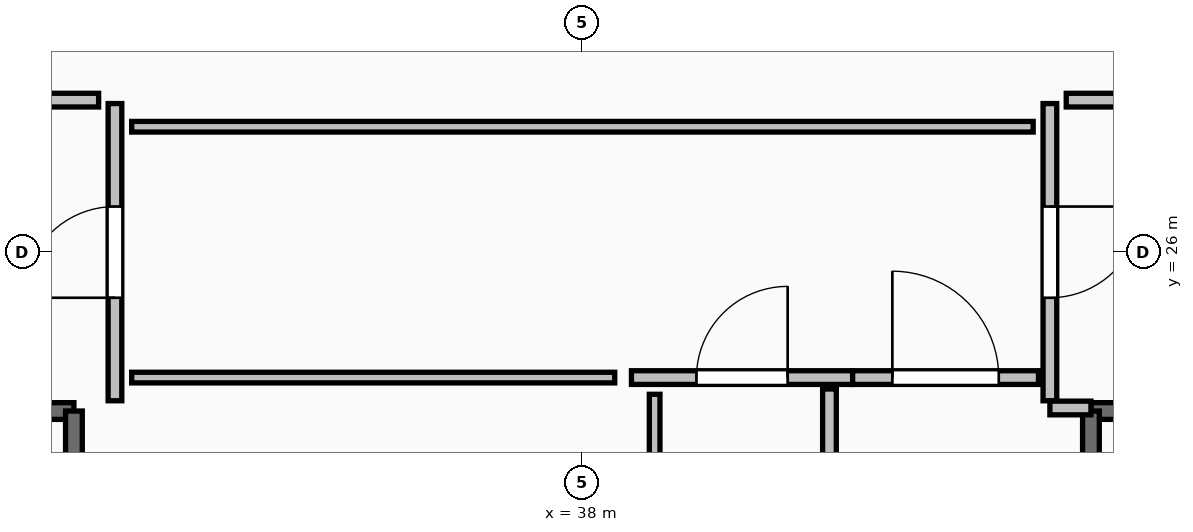
"""IFC4 building model, lengths in metres.
Left out: names, types, materials, properties, quantities, classifications, styles, units other than length and angle.
Written with IfcOpenShell. Run it as: python <this file> out.ifc"""

import sys

from ifc_helpers import new_model, si_unit, direction, frame, frame_2d, origin, place, context, subcontext, project, spatial, rectangle, extrude, element, fill, save


model = new_model("IFC4")
c1 = context("Model", 3, precision=1e-05, world=origin(), true_north=direction((0.0, 1.0)))
c2 = subcontext(c1, "Body", "Model", "MODEL_VIEW")
j1 = project(units=[si_unit("LENGTHUNIT", "METRE"), si_unit("PLANEANGLEUNIT", "RADIAN")], contexts=[c1])
p1 = place(None, origin())
s1 = spatial("IfcSite", under=j1, at=p1, CompositionType="ELEMENT")
p2 = place(p1, origin())
s2 = spatial("IfcBuilding", under=s1, at=p2, CompositionType="ELEMENT")
p3 = place(p2, frame((0.0, 0.0, -4.8)))
s3 = spatial("IfcBuildingStorey", under=s2, at=p3, CompositionType="ELEMENT", Elevation=-4.8)
p4 = place(p3, frame((27.94, 23.91, 0.0), z_axis=(0.0, 0.0, 1.0), x_axis=(1.0, 0.0, 0.0)))
e1 = element("IfcWall", 1, at=p4, inside=s3, PredefinedType="SOLIDWALL", context=c2, shape_type="SweptSolid", body=[
    extrude(rectangle(XDim=3.37, YDim=0.22, at=frame_2d((1.685, 0.0))), origin(), (0.0, 0.0, 1.0), 4.46),
])
p5 = place(p4, frame((1.135, 0.0, 0.0)))
e2 = element("IfcOpeningElement", 2, at=p5, cuts=e1, PredefinedType="OPENING", context=c2, shape_type="SweptSolid", body=[
    extrude(rectangle(XDim=1.1, YDim=2.15, at=frame_2d((0.55, 1.075))), frame((0.0, 0.125, 0.0), z_axis=(0.0, -1.0, 0.0), x_axis=(1.0, 0.0, 0.0)), (0.0, 0.0, 1.0), 0.25),
])
p6 = place(p3, frame((31.31, 23.91, 0.0), z_axis=(0.0, 0.0, 1.0), x_axis=(0.0, -1.0, 0.0)))
e3 = element("IfcWall", 3, at=p6, inside=s3, PredefinedType="SOLIDWALL", context=c2, shape_type="SweptSolid", body=[
    extrude(rectangle(XDim=7.42, YDim=0.22, at=frame_2d((3.71, 0.0))), origin(), (0.0, 0.0, 1.0), 4.46),
])
p7 = place(p3, frame((44.69, 23.91, 0.0), z_axis=(0.0, 0.0, 1.0), x_axis=(1.0, 0.0, 0.0)))
e4 = element("IfcWall", 4, at=p7, inside=s3, PredefinedType="SOLIDWALL", context=c2, shape_type="SweptSolid", body=[
    extrude(rectangle(XDim=3.37, YDim=0.22, at=frame_2d((1.685, 0.0))), origin(), (0.0, 0.0, 1.0), 4.46),
])
p8 = place(p7, frame((1.135, 0.0, 0.0)))
e5 = element("IfcOpeningElement", 5, at=p8, cuts=e4, PredefinedType="OPENING", context=c2, shape_type="SweptSolid", body=[
    extrude(rectangle(XDim=1.1, YDim=2.15, at=frame_2d((0.55, 1.075))), frame((0.0, 0.125, 0.0), z_axis=(0.0, -1.0, 0.0), x_axis=(1.0, 0.0, 0.0)), (0.0, 0.0, 1.0), 0.25),
])
p9 = place(p3, frame((44.69, 16.49, 0.0), z_axis=(0.0, 0.0, 1.0), x_axis=(0.0, 1.0, 0.0)))
e6 = element("IfcWall", 6, at=p9, inside=s3, PredefinedType="SOLIDWALL", context=c2, shape_type="SweptSolid", body=[
    extrude(rectangle(XDim=7.42, YDim=0.22, at=frame_2d((3.71, 0.0))), origin(), (0.0, 0.0, 1.0), 4.46),
])
p10 = place(p3, frame((31.85, 24.045, 0.0), z_axis=(0.0, 0.0, 1.0), x_axis=(0.0, 1.0, 0.0)))
e7 = element("IfcWall", 7, at=p10, inside=s3, PredefinedType="PARTITIONING", context=c2, shape_type="SweptSolid", body=[
    extrude(rectangle(XDim=3.91, YDim=0.18, at=frame_2d((1.955, 0.0))), origin(), (0.0, 0.0, 1.0), 4.46),
])
p11 = place(p10, frame((1.355, 0.0, 0.0)))
e8 = element("IfcOpeningElement", 8, at=p11, cuts=e7, PredefinedType="OPENING", context=c2, shape_type="SweptSolid", body=[
    extrude(rectangle(XDim=1.2, YDim=2.15, at=frame_2d((0.6, 1.075))), frame((0.0, 0.105, 0.0), z_axis=(0.0, -1.0, 0.0), x_axis=(1.0, 0.0, 0.0)), (0.0, 0.0, 1.0), 0.21),
])
p12 = place(p3, frame((44.15, 27.955, 0.0), z_axis=(0.0, 0.0, 1.0), x_axis=(0.0, -1.0, 0.0)))
e9 = element("IfcWall", 9, at=p12, inside=s3, PredefinedType="PARTITIONING", context=c2, shape_type="SweptSolid", body=[
    extrude(rectangle(XDim=3.91, YDim=0.18, at=frame_2d((1.955, 0.0))), origin(), (0.0, 0.0, 1.0), 4.46),
])
p13 = place(p12, frame((1.355, 0.0, 0.0)))
e10 = element("IfcOpeningElement", 10, at=p13, cuts=e9, PredefinedType="OPENING", context=c2, shape_type="SweptSolid", body=[
    extrude(rectangle(XDim=1.2, YDim=2.15, at=frame_2d((0.6, 1.075))), frame((0.0, 0.105, 0.0), z_axis=(0.0, -1.0, 0.0), x_axis=(1.0, 0.0, 0.0)), (0.0, 0.0, 1.0), 0.21),
])
p14 = place(p3, frame((44.15, 23.95, 0.0), z_axis=(0.0, 0.0, 1.0), x_axis=(1.0, 0.0, 0.0)))
e11 = element("IfcWall", 11, at=p14, inside=s3, PredefinedType="PARTITIONING", context=c2, shape_type="SweptSolid", body=[
    extrude(rectangle(XDim=0.54, YDim=0.18, at=frame_2d((0.27, 0.0))), origin(), (0.0, 0.0, 1.0), 4.46),
])
p15 = place(p3, frame((38.645, 24.35, 0.0), z_axis=(0.0, 0.0, 1.0), x_axis=(1.0, 0.0, 0.0)))
e12 = element("IfcWall", 12, at=p15, inside=s3, PredefinedType="PARTITIONING", context=c2, shape_type="SweptSolid", body=[
    extrude(rectangle(XDim=2.91, YDim=0.18, at=frame_2d((1.455, 0.0))), origin(), (0.0, 0.0, 1.0), 4.46),
])
p16 = place(p15, frame((0.855, 0.0, 0.0)))
e13 = element("IfcOpeningElement", 13, at=p16, cuts=e12, PredefinedType="OPENING", context=c2, shape_type="SweptSolid", body=[
    extrude(rectangle(XDim=1.2, YDim=2.15, at=frame_2d((0.6, 1.075))), frame((0.0, 0.105, 0.0), z_axis=(0.0, -1.0, 0.0), x_axis=(1.0, 0.0, 0.0)), (0.0, 0.0, 1.0), 0.21),
])
p17 = place(p3, frame((41.555, 24.35, 0.0), z_axis=(0.0, 0.0, 1.0), x_axis=(1.0, 0.0, 0.0)))
e14 = element("IfcWall", 14, at=p17, inside=s3, PredefinedType="PARTITIONING", context=c2, shape_type="SweptSolid", body=[
    extrude(rectangle(XDim=2.445, YDim=0.18, at=frame_2d((1.223, 0.0))), origin(), (0.0, 0.0, 1.0), 4.46),
])
p18 = place(p17, frame((0.522, 0.0, 0.0)))
e15 = element("IfcOpeningElement", 15, at=p18, cuts=e14, PredefinedType="OPENING", context=c2, shape_type="SweptSolid", body=[
    extrude(rectangle(XDim=1.4, YDim=2.2, at=frame_2d((0.7, 1.1))), frame((0.0, 0.105, 0.0), z_axis=(0.0, -1.0, 0.0), x_axis=(1.0, 0.0, 0.0)), (0.0, 0.0, 1.0), 0.21),
])
p19 = place(p3, frame((41.25, 19.105, 0.0), z_axis=(0.0, 0.0, 1.0), x_axis=(0.0, 1.0, 0.0)))
e16 = element("IfcWall", 16, at=p19, inside=s3, PredefinedType="PARTITIONING", context=c2, shape_type="SweptSolid", body=[
    extrude(rectangle(XDim=5.095, YDim=0.18, at=frame_2d((2.547, 0.0))), origin(), (0.0, 0.0, 1.0), 4.46),
])
p20 = place(p19, frame((1.847, 0.0, 0.0)))
e17 = element("IfcOpeningElement", 17, at=p20, cuts=e16, PredefinedType="OPENING", context=c2, shape_type="SweptSolid", body=[
    extrude(rectangle(XDim=1.4, YDim=2.2, at=frame_2d((0.7, 1.1))), frame((0.0, 0.105, 0.0), z_axis=(0.0, -1.0, 0.0), x_axis=(1.0, 0.0, 0.0)), (0.0, 0.0, 1.0), 0.21),
])
for number, where, z_axis, x_axis in (
    (18, (31.635, 28.0, 0.0), (0.0, 0.0, 1.0), (-1.0, 0.0, 0.0)),
    (19, (45.28, 28.0, 0.0), (0.0, 0.0, 1.0), (-1.0, 0.0, 0.0)),
):
    element("IfcWall", number, at=place(p3, frame(where, z_axis=z_axis, x_axis=x_axis)), inside=s3, PredefinedType="PARTITIONING", context=c2, shape_type="SweptSolid", body=[
        extrude(rectangle(XDim=0.915, YDim=0.18, at=frame_2d((0.458, 0.0))), origin(), (0.0, 0.0, 1.0), 4.46),
    ])
p21 = place(p3, frame((43.93, 27.65, 0.0), z_axis=(0.0, 0.0, 1.0), x_axis=(-1.0, 0.0, 0.0)))
e20 = element("IfcWall", 20, at=p21, inside=s3, PredefinedType="PARTITIONING", context=c2, shape_type="SweptSolid", body=[
    extrude(rectangle(XDim=11.86, YDim=0.14, at=frame_2d((5.93, 0.0))), origin(), (0.0, 0.0, 1.0), 4.46),
])
p22 = place(p3, frame((32.07, 24.35, 0.0), z_axis=(0.0, 0.0, 1.0), x_axis=(1.0, 0.0, 0.0)))
e21 = element("IfcWall", 21, at=p22, inside=s3, PredefinedType="PARTITIONING", context=c2, shape_type="SweptSolid", body=[
    extrude(rectangle(XDim=6.355, YDim=0.14, at=frame_2d((3.177, 0.0))), origin(), (0.0, 0.0, 1.0), 4.46),
])
p23 = place(p3, frame((38.95, 24.13, 0.0), z_axis=(0.0, 0.0, 1.0), x_axis=(0.0, -1.0, 0.0)))
e22 = element("IfcWall", 22, at=p23, inside=s3, PredefinedType="PARTITIONING", context=c2, shape_type="SweptSolid", body=[
    extrude(rectangle(XDim=2.155, YDim=0.14, at=frame_2d((1.077, 0.0))), origin(), (0.0, 0.0, 1.0), 4.46),
])
p24 = place(p11, origin())
e23 = element("IfcDoor", 23, at=p24, inside=s3, OperationType="SINGLE_SWING_LEFT", PredefinedType="DOOR", context=c2, shape_type="SweptSolid", body=[
    extrude(rectangle(XDim=1.2, YDim=2.15, at=frame_2d((0.6, 1.075))), frame((0.0, 0.025, 0.0), z_axis=(0.0, -1.0, 0.0), x_axis=(1.0, 0.0, 0.0)), (0.0, 0.0, 1.0), 0.05),
])
fill(e8, e23)
p25 = place(p13, origin())
e24 = element("IfcDoor", 24, at=p25, inside=s3, OperationType="SINGLE_SWING_LEFT", PredefinedType="DOOR", context=c2, shape_type="SweptSolid", body=[
    extrude(rectangle(XDim=1.2, YDim=2.15, at=frame_2d((0.6, 1.075))), frame((0.0, 0.025, 0.0), z_axis=(0.0, -1.0, 0.0), x_axis=(1.0, 0.0, 0.0)), (0.0, 0.0, 1.0), 0.05),
])
fill(e10, e24)
p26 = place(p16, origin())
e25 = element("IfcDoor", 25, at=p26, inside=s3, OperationType="SINGLE_SWING_RIGHT", PredefinedType="DOOR", context=c2, shape_type="SweptSolid", body=[
    extrude(rectangle(XDim=1.2, YDim=2.15, at=frame_2d((0.6, 1.075))), frame((0.0, 0.025, 0.0), z_axis=(0.0, -1.0, 0.0), x_axis=(1.0, 0.0, 0.0)), (0.0, 0.0, 1.0), 0.05),
])
fill(e13, e25)
p27 = place(p18, origin())
e26 = element("IfcDoor", 26, at=p27, inside=s3, OperationType="DOUBLE_SWING_LEFT", PredefinedType="DOOR", context=c2, shape_type="SweptSolid", body=[
    extrude(rectangle(XDim=1.4, YDim=2.2, at=frame_2d((0.7, 1.1))), frame((0.0, 0.025, 0.0), z_axis=(0.0, -1.0, 0.0), x_axis=(1.0, 0.0, 0.0)), (0.0, 0.0, 1.0), 0.05),
])
fill(e15, e26)
save(model, sys.argv[1])
